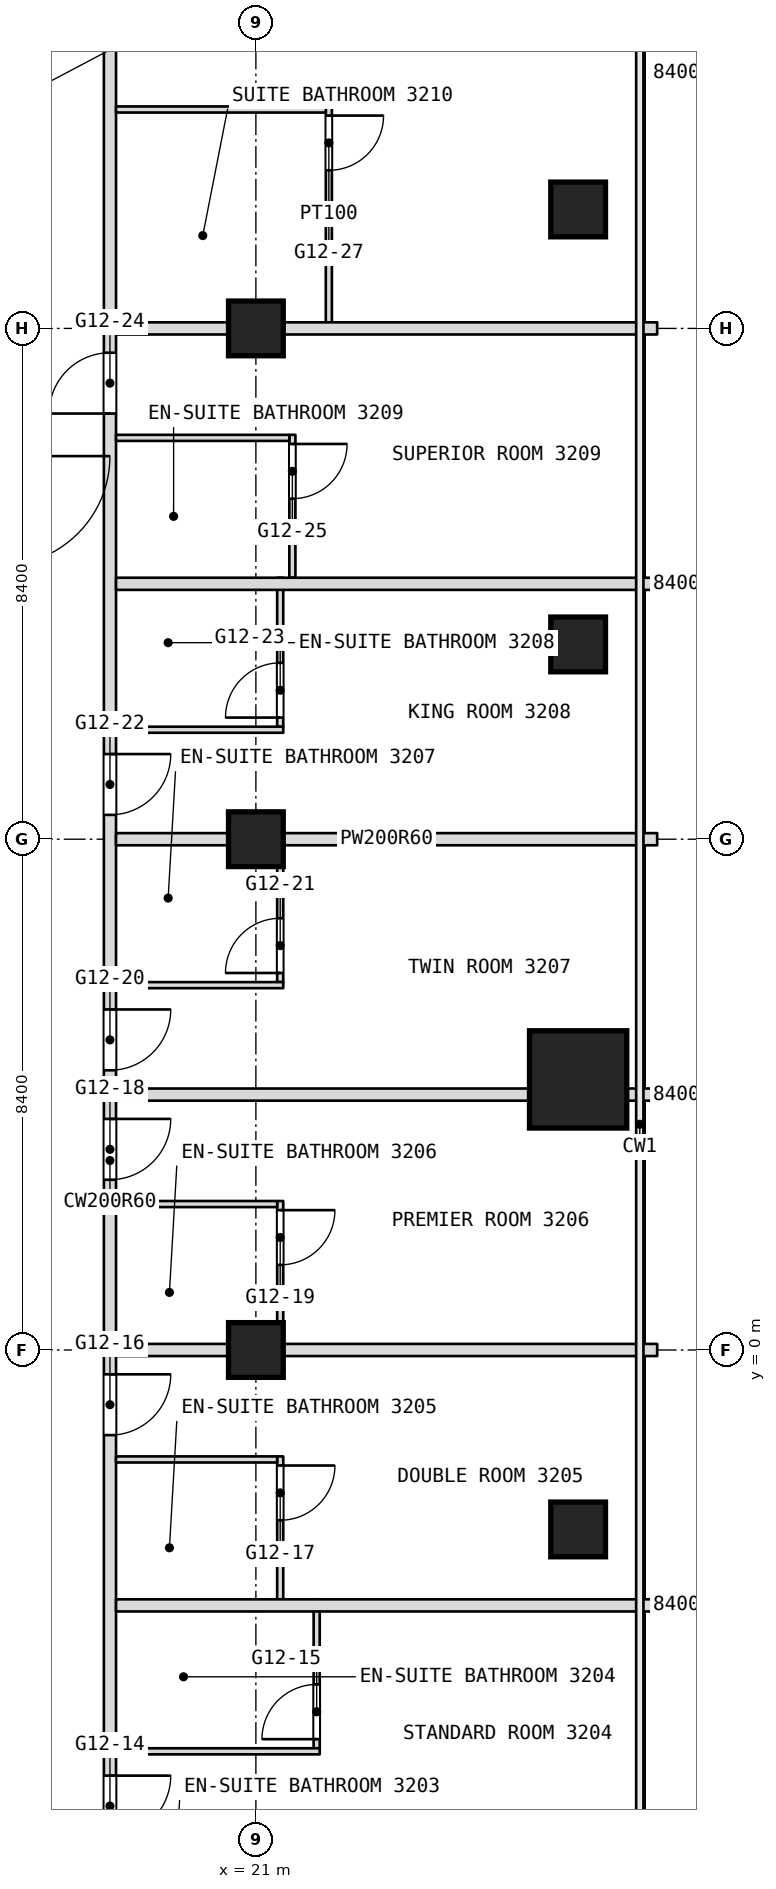
"""IFC4 building model, lengths in metres.
Left out: names, types, materials, properties, quantities, classifications, styles, units other than length and angle.
Written with IfcOpenShell. Run it as: python <this file> out.ifc"""

import sys

from ifc_helpers import new_model, si_unit, direction, frame, frame_2d, origin, origin_2d, place, context, subcontext, project, spatial, rectangle, extrude, element, fill, save


model = new_model("IFC4")
c1 = context("Model", 3, precision=1e-05, world=origin(), true_north=direction((0.0, 1.0)))
c2 = subcontext(c1, "Body", "Model", "MODEL_VIEW")
j1 = project(units=[si_unit("LENGTHUNIT", "METRE"), si_unit("PLANEANGLEUNIT", "RADIAN")], contexts=[c1])
p1 = place(None, origin())
s1 = spatial("IfcSite", under=j1, at=p1, CompositionType="ELEMENT")
p2 = place(p1, origin())
s2 = spatial("IfcBuilding", under=s1, at=p2, CompositionType="ELEMENT")
p3 = place(p2, frame((0.0, 0.0, 140.9)))
s3 = spatial("IfcBuildingStorey", under=s2, at=p3, CompositionType="ELEMENT", Elevation=140.9)
p4 = place(p3, frame((26.3, 4.45, 0.0), z_axis=(0.0, 0.0, 1.0), x_axis=(1.0, 0.0, 0.0)))
e1 = element("IfcColumn", 1, at=p4, inside=s3, PredefinedType="COLUMN", context=c2, shape_type="SweptSolid", body=[
    extrude(rectangle(XDim=1.6, YDim=1.6, at=origin_2d()), origin(), (0.0, 0.0, 1.0), 3.6),
])
for number, where, z_axis, x_axis in (
    (2, (21.0, 0.0, 0.0), (0.0, 0.0, 1.0), (1.0, 0.0, 0.0)),
    (3, (21.0, 8.4, 0.0), (0.0, 0.0, 1.0), (1.0, 0.0, 0.0)),
    (4, (21.0, 16.8, 0.0), (0.0, 0.0, 1.0), (1.0, 0.0, 0.0)),
    (5, (26.3, 18.756, 0.0), (0.0, 0.0, 1.0), (1.0, 0.0, 0.0)),
    (6, (26.3, 11.603, 0.0), (0.0, 0.0, 1.0), (1.0, 0.0, 0.0)),
    (7, (26.3, -2.951, 0.0), (0.0, 0.0, 1.0), (1.0, 0.0, 0.0)),
):
    element("IfcColumn", number, at=place(p3, frame(where, z_axis=z_axis, x_axis=x_axis)), inside=s3, PredefinedType="COLUMN", context=c2, shape_type="SweptSolid", body=[
        extrude(rectangle(XDim=0.9, YDim=0.9, at=origin_2d()), origin(), (0.0, 0.0, 1.0), 3.6),
    ])
p5 = place(p3, frame((22.2, 16.9, 0.0), z_axis=(0.0, 0.0, 1.0), x_axis=(0.0, 1.0, 0.0)))
e8 = element("IfcWall", 8, at=p5, inside=s3, PredefinedType="PARTITIONING", context=c2, shape_type="SweptSolid", body=[
    extrude(rectangle(XDim=3.55, YDim=0.1, at=frame_2d((1.775, 0.0))), origin(), (0.0, 0.0, 1.0), 3.34),
])
p6 = place(p5, frame((2.5, 0.0, 0.0)))
e9 = element("IfcOpeningElement", 9, at=p6, cuts=e8, PredefinedType="OPENING", context=c2, shape_type="SweptSolid", body=[
    extrude(rectangle(XDim=0.9, YDim=2.1, at=frame_2d((0.45, 1.05))), frame((0.0, 0.05, 0.0), z_axis=(0.0, -1.0, 0.0), x_axis=(1.0, 0.0, 0.0)), (0.0, 0.0, 1.0), 0.1),
])
p7 = place(p3, frame((22.0, -6.55, 0.0), z_axis=(0.0, 0.0, 1.0), x_axis=(0.0, 1.0, 0.0)))
e10 = element("IfcWall", 10, at=p7, inside=s3, PredefinedType="PARTITIONING", context=c2, shape_type="SweptSolid", body=[
    extrude(rectangle(XDim=2.45, YDim=0.1, at=frame_2d((1.225, 0.0))), origin(), (0.0, 0.0, 1.0), 3.34),
])
p8 = place(p7, frame((0.15, 0.0, 0.0)))
e11 = element("IfcOpeningElement", 11, at=p8, cuts=e10, PredefinedType="OPENING", context=c2, shape_type="SweptSolid", body=[
    extrude(rectangle(XDim=0.9, YDim=2.1, at=frame_2d((0.45, 1.05))), frame((0.0, 0.05, 0.0), z_axis=(0.0, -1.0, 0.0), x_axis=(1.0, 0.0, 0.0)), (0.0, 0.0, 1.0), 0.1),
])
p9 = place(p3, frame((21.6, 12.7, 0.0), z_axis=(0.0, 0.0, 1.0), x_axis=(0.0, 1.0, 0.0)))
e12 = element("IfcWall", 12, at=p9, inside=s3, PredefinedType="PARTITIONING", context=c2, shape_type="SweptSolid", body=[
    extrude(rectangle(XDim=2.35, YDim=0.1, at=frame_2d((1.175, 0.0))), origin(), (0.0, 0.0, 1.0), 3.34),
])
p10 = place(p9, frame((1.3, 0.0, 0.0)))
e13 = element("IfcOpeningElement", 13, at=p10, cuts=e12, PredefinedType="OPENING", context=c2, shape_type="SweptSolid", body=[
    extrude(rectangle(XDim=0.9, YDim=2.1, at=frame_2d((0.45, 1.05))), frame((0.0, 0.05, 0.0), z_axis=(0.0, -1.0, 0.0), x_axis=(1.0, 0.0, 0.0)), (0.0, 0.0, 1.0), 0.1),
])
p11 = place(p3, frame((21.4, -4.1, 0.0), z_axis=(0.0, 0.0, 1.0), x_axis=(0.0, 1.0, 0.0)))
e14 = element("IfcWall", 14, at=p11, inside=s3, PredefinedType="PARTITIONING", context=c2, shape_type="SweptSolid", body=[
    extrude(rectangle(XDim=2.35, YDim=0.1, at=frame_2d((1.175, 0.0))), origin(), (0.0, 0.0, 1.0), 3.34),
])
p12 = place(p11, frame((1.3, 0.0, 0.0)))
e15 = element("IfcOpeningElement", 15, at=p12, cuts=e14, PredefinedType="OPENING", context=c2, shape_type="SweptSolid", body=[
    extrude(rectangle(XDim=0.9, YDim=2.1, at=frame_2d((0.45, 1.05))), frame((0.0, 0.05, 0.0), z_axis=(0.0, -1.0, 0.0), x_axis=(1.0, 0.0, 0.0)), (0.0, 0.0, 1.0), 0.1),
])
p13 = place(p3, frame((21.4, 0.1, 0.0), z_axis=(0.0, 0.0, 1.0), x_axis=(0.0, 1.0, 0.0)))
e16 = element("IfcWall", 16, at=p13, inside=s3, PredefinedType="PARTITIONING", context=c2, shape_type="SweptSolid", body=[
    extrude(rectangle(XDim=2.35, YDim=0.1, at=frame_2d((1.175, 0.0))), origin(), (0.0, 0.0, 1.0), 3.34),
])
p14 = place(p13, frame((1.3, 0.0, 0.0)))
e17 = element("IfcOpeningElement", 17, at=p14, cuts=e16, PredefinedType="OPENING", context=c2, shape_type="SweptSolid", body=[
    extrude(rectangle(XDim=0.9, YDim=2.1, at=frame_2d((0.45, 1.05))), frame((0.0, 0.05, 0.0), z_axis=(0.0, -1.0, 0.0), x_axis=(1.0, 0.0, 0.0)), (0.0, 0.0, 1.0), 0.1),
])
p15 = place(p3, frame((21.4, 6.05, 0.0), z_axis=(0.0, 0.0, 1.0), x_axis=(0.0, 1.0, 0.0)))
e18 = element("IfcWall", 18, at=p15, inside=s3, PredefinedType="PARTITIONING", context=c2, shape_type="SweptSolid", body=[
    extrude(rectangle(XDim=2.45, YDim=0.1, at=frame_2d((1.225, 0.0))), origin(), (0.0, 0.0, 1.0), 3.34),
])
p16 = place(p15, frame((0.15, 0.0, 0.0)))
e19 = element("IfcOpeningElement", 19, at=p16, cuts=e18, PredefinedType="OPENING", context=c2, shape_type="SweptSolid", body=[
    extrude(rectangle(XDim=0.9, YDim=2.1, at=frame_2d((0.45, 1.05))), frame((0.0, 0.05, 0.0), z_axis=(0.0, -1.0, 0.0), x_axis=(1.0, 0.0, 0.0)), (0.0, 0.0, 1.0), 0.1),
])
p17 = place(p3, frame((21.4, 10.25, 0.0), z_axis=(0.0, 0.0, 1.0), x_axis=(0.0, 1.0, 0.0)))
e20 = element("IfcWall", 20, at=p17, inside=s3, PredefinedType="PARTITIONING", context=c2, shape_type="SweptSolid", body=[
    extrude(rectangle(XDim=2.45, YDim=0.1, at=frame_2d((1.225, 0.0))), origin(), (0.0, 0.0, 1.0), 3.34),
])
p18 = place(p17, frame((0.15, 0.0, 0.0)))
e21 = element("IfcOpeningElement", 21, at=p18, cuts=e20, PredefinedType="OPENING", context=c2, shape_type="SweptSolid", body=[
    extrude(rectangle(XDim=0.9, YDim=2.1, at=frame_2d((0.45, 1.05))), frame((0.0, 0.05, 0.0), z_axis=(0.0, -1.0, 0.0), x_axis=(1.0, 0.0, 0.0)), (0.0, 0.0, 1.0), 0.1),
])
p19 = place(p3, frame((18.6, -21.708, 0.0), z_axis=(0.0, 0.0, 1.0), x_axis=(0.0, 1.0, 0.0)))
e22 = element("IfcWall", 22, at=p19, inside=s3, PredefinedType="PARTITIONING", context=c2, shape_type="SweptSolid", body=[
    extrude(rectangle(XDim=49.648, YDim=0.2, at=frame_2d((24.824, 0.0))), origin(), (0.0, 0.0, 1.0), 3.34),
])
p20 = place(p19, frame((2.8, 0.0, 0.0)))
e23 = element("IfcOpeningElement", 23, at=p20, cuts=e22, PredefinedType="OPENING", context=c2, shape_type="SweptSolid", body=[
    extrude(rectangle(XDim=1.0, YDim=2.1, at=frame_2d((0.5, 1.05))), frame((0.0, 0.1, 0.0), z_axis=(0.0, -1.0, 0.0), x_axis=(1.0, 0.0, 0.0)), (0.0, 0.0, 1.0), 0.2),
])
p21 = place(p19, frame((7.708, 0.0, 0.0)))
e24 = element("IfcOpeningElement", 24, at=p21, cuts=e22, PredefinedType="OPENING", context=c2, shape_type="SweptSolid", body=[
    extrude(rectangle(XDim=1.0, YDim=2.1, at=frame_2d((0.5, 1.05))), frame((0.0, 0.1, 0.0), z_axis=(0.0, -1.0, 0.0), x_axis=(1.0, 0.0, 0.0)), (0.0, 0.0, 1.0), 0.2),
])
p22 = place(p19, frame((9.508, 0.0, 0.0)))
e25 = element("IfcOpeningElement", 25, at=p22, cuts=e22, PredefinedType="OPENING", context=c2, shape_type="SweptSolid", body=[
    extrude(rectangle(XDim=1.0, YDim=2.1, at=frame_2d((0.5, 1.05))), frame((0.0, 0.1, 0.0), z_axis=(0.0, -1.0, 0.0), x_axis=(1.0, 0.0, 0.0)), (0.0, 0.0, 1.0), 0.2),
])
p23 = place(p19, frame((13.708, 0.0, 0.0)))
e26 = element("IfcOpeningElement", 26, at=p23, cuts=e22, PredefinedType="OPENING", context=c2, shape_type="SweptSolid", body=[
    extrude(rectangle(XDim=1.0, YDim=2.1, at=frame_2d((0.5, 1.05))), frame((0.0, 0.1, 0.0), z_axis=(0.0, -1.0, 0.0), x_axis=(1.0, 0.0, 0.0)), (0.0, 0.0, 1.0), 0.2),
])
p24 = place(p19, frame((20.308, 0.0, 0.0)))
e27 = element("IfcOpeningElement", 27, at=p24, cuts=e22, PredefinedType="OPENING", context=c2, shape_type="SweptSolid", body=[
    extrude(rectangle(XDim=1.0, YDim=2.1, at=frame_2d((0.5, 1.05))), frame((0.0, 0.1, 0.0), z_axis=(0.0, -1.0, 0.0), x_axis=(1.0, 0.0, 0.0)), (0.0, 0.0, 1.0), 0.2),
])
p25 = place(p19, frame((24.508, 0.0, 0.0)))
e28 = element("IfcOpeningElement", 28, at=p25, cuts=e22, PredefinedType="OPENING", context=c2, shape_type="SweptSolid", body=[
    extrude(rectangle(XDim=1.0, YDim=2.1, at=frame_2d((0.5, 1.05))), frame((0.0, 0.1, 0.0), z_axis=(0.0, -1.0, 0.0), x_axis=(1.0, 0.0, 0.0)), (0.0, 0.0, 1.0), 0.2),
])
p26 = place(p19, frame((26.308, 0.0, 0.0)))
e29 = element("IfcOpeningElement", 29, at=p26, cuts=e22, PredefinedType="OPENING", context=c2, shape_type="SweptSolid", body=[
    extrude(rectangle(XDim=1.0, YDim=2.1, at=frame_2d((0.5, 1.05))), frame((0.0, 0.1, 0.0), z_axis=(0.0, -1.0, 0.0), x_axis=(1.0, 0.0, 0.0)), (0.0, 0.0, 1.0), 0.2),
])
p27 = place(p19, frame((30.508, 0.0, 0.0)))
e30 = element("IfcOpeningElement", 30, at=p27, cuts=e22, PredefinedType="OPENING", context=c2, shape_type="SweptSolid", body=[
    extrude(rectangle(XDim=1.0, YDim=2.1, at=frame_2d((0.5, 1.05))), frame((0.0, 0.1, 0.0), z_axis=(0.0, -1.0, 0.0), x_axis=(1.0, 0.0, 0.0)), (0.0, 0.0, 1.0), 0.2),
])
p28 = place(p19, frame((37.108, 0.0, 0.0)))
e31 = element("IfcOpeningElement", 31, at=p28, cuts=e22, PredefinedType="OPENING", context=c2, shape_type="SweptSolid", body=[
    extrude(rectangle(XDim=1.0, YDim=2.1, at=frame_2d((0.5, 1.05))), frame((0.0, 0.1, 0.0), z_axis=(0.0, -1.0, 0.0), x_axis=(1.0, 0.0, 0.0)), (0.0, 0.0, 1.0), 0.2),
])
p29 = place(p19, frame((43.558, 0.0, 0.0)))
e32 = element("IfcOpeningElement", 32, at=p29, cuts=e22, PredefinedType="OPENING", context=c2, shape_type="SweptSolid", body=[
    extrude(rectangle(XDim=1.1, YDim=2.1, at=frame_2d((0.55, 1.05))), frame((0.0, 0.1, 0.0), z_axis=(0.0, -1.0, 0.0), x_axis=(1.0, 0.0, 0.0)), (0.0, 0.0, 1.0), 0.2),
])
p30 = place(p3, frame((18.7, -6.6, 0.0), z_axis=(0.0, 0.0, 1.0), x_axis=(1.0, 0.0, 0.0)))
e33 = element("IfcWall", 33, at=p30, inside=s3, PredefinedType="PARTITIONING", context=c2, shape_type="SweptSolid", body=[
    extrude(rectangle(XDim=3.35, YDim=0.1, at=frame_2d((1.675, 0.0))), origin(), (0.0, 0.0, 1.0), 3.34),
])
p31 = place(p3, frame((18.7, -4.2, 0.0), z_axis=(0.0, 0.0, 1.0), x_axis=(1.0, 0.0, 0.0)))
e34 = element("IfcWall", 34, at=p31, inside=s3, PredefinedType="PARTITIONING", context=c2, shape_type="SweptSolid", body=[
    extrude(rectangle(XDim=8.9, YDim=0.2, at=frame_2d((4.45, 0.0))), origin(), (0.0, 0.0, 1.0), 3.34),
])
p32 = place(p3, frame((18.7, -1.8, 0.0), z_axis=(0.0, 0.0, 1.0), x_axis=(1.0, 0.0, 0.0)))
e35 = element("IfcWall", 35, at=p32, inside=s3, PredefinedType="PARTITIONING", context=c2, shape_type="SweptSolid", body=[
    extrude(rectangle(XDim=2.65, YDim=0.1, at=frame_2d((1.325, 0.0))), origin(), (0.0, 0.0, 1.0), 3.34),
])
p33 = place(p3, frame((18.7, 0.0, 0.0), z_axis=(0.0, 0.0, 1.0), x_axis=(1.0, 0.0, 0.0)))
e36 = element("IfcWall", 36, at=p33, inside=s3, PredefinedType="PARTITIONING", context=c2, shape_type="SweptSolid", body=[
    extrude(rectangle(XDim=8.9, YDim=0.2, at=frame_2d((4.45, 0.0))), origin(), (0.0, 0.0, 1.0), 2.89),
])
p34 = place(p3, frame((18.7, 2.4, 0.0), z_axis=(0.0, 0.0, 1.0), x_axis=(1.0, 0.0, 0.0)))
e37 = element("IfcWall", 37, at=p34, inside=s3, PredefinedType="PARTITIONING", context=c2, shape_type="SweptSolid", body=[
    extrude(rectangle(XDim=2.65, YDim=0.1, at=frame_2d((1.325, 0.0))), origin(), (0.0, 0.0, 1.0), 3.34),
])
p35 = place(p3, frame((18.7, 4.2, 0.0), z_axis=(0.0, 0.0, 1.0), x_axis=(1.0, 0.0, 0.0)))
e38 = element("IfcWall", 38, at=p35, inside=s3, PredefinedType="PARTITIONING", context=c2, shape_type="SweptSolid", body=[
    extrude(rectangle(XDim=6.8, YDim=0.2, at=frame_2d((3.4, 0.0))), origin(), (0.0, 0.0, 1.0), 3.34),
])
p36 = place(p3, frame((27.1, 4.2, 0.0), z_axis=(0.0, 0.0, 1.0), x_axis=(1.0, 0.0, 0.0)))
e39 = element("IfcWall", 39, at=p36, inside=s3, PredefinedType="PARTITIONING", context=c2, shape_type="SweptSolid", body=[
    extrude(rectangle(XDim=0.5, YDim=0.2, at=frame_2d((0.25, 0.0))), origin(), (0.0, 0.0, 1.0), 3.34),
])
p37 = place(p3, frame((18.7, 6.0, 0.0), z_axis=(0.0, 0.0, 1.0), x_axis=(1.0, 0.0, 0.0)))
e40 = element("IfcWall", 40, at=p37, inside=s3, PredefinedType="PARTITIONING", context=c2, shape_type="SweptSolid", body=[
    extrude(rectangle(XDim=2.75, YDim=0.1, at=frame_2d((1.375, 0.0))), origin(), (0.0, 0.0, 1.0), 3.34),
])
p38 = place(p3, frame((18.7, 8.4, 0.0), z_axis=(0.0, 0.0, 1.0), x_axis=(1.0, 0.0, 0.0)))
e41 = element("IfcWall", 41, at=p38, inside=s3, PredefinedType="PARTITIONING", context=c2, shape_type="SweptSolid", body=[
    extrude(rectangle(XDim=8.9, YDim=0.2, at=frame_2d((4.45, 0.0))), origin(), (0.0, 0.0, 1.0), 2.89),
])
p39 = place(p3, frame((18.7, 10.2, 0.0), z_axis=(0.0, 0.0, 1.0), x_axis=(1.0, 0.0, 0.0)))
e42 = element("IfcWall", 42, at=p39, inside=s3, PredefinedType="PARTITIONING", context=c2, shape_type="SweptSolid", body=[
    extrude(rectangle(XDim=2.75, YDim=0.1, at=frame_2d((1.375, 0.0))), origin(), (0.0, 0.0, 1.0), 3.34),
])
p40 = place(p3, frame((18.7, 12.6, 0.0), z_axis=(0.0, 0.0, 1.0), x_axis=(1.0, 0.0, 0.0)))
e43 = element("IfcWall", 43, at=p40, inside=s3, PredefinedType="PARTITIONING", context=c2, shape_type="SweptSolid", body=[
    extrude(rectangle(XDim=8.9, YDim=0.2, at=frame_2d((4.45, 0.0))), origin(), (0.0, 0.0, 1.0), 3.34),
])
p41 = place(p3, frame((18.7, 15.0, 0.0), z_axis=(0.0, 0.0, 1.0), x_axis=(1.0, 0.0, 0.0)))
e44 = element("IfcWall", 44, at=p41, inside=s3, PredefinedType="PARTITIONING", context=c2, shape_type="SweptSolid", body=[
    extrude(rectangle(XDim=2.85, YDim=0.1, at=frame_2d((1.425, 0.0))), origin(), (0.0, 0.0, 1.0), 3.34),
])
p42 = place(p3, frame((18.7, 16.8, 0.0), z_axis=(0.0, 0.0, 1.0), x_axis=(1.0, 0.0, 0.0)))
e45 = element("IfcWall", 45, at=p42, inside=s3, PredefinedType="PARTITIONING", context=c2, shape_type="SweptSolid", body=[
    extrude(rectangle(XDim=8.9, YDim=0.2, at=frame_2d((4.45, 0.0))), origin(), (0.0, 0.0, 1.0), 2.89),
])
p43 = place(p3, frame((18.7, 20.4, 0.0), z_axis=(0.0, 0.0, 1.0), x_axis=(1.0, 0.0, 0.0)))
e46 = element("IfcWall", 46, at=p43, inside=s3, PredefinedType="PARTITIONING", context=c2, shape_type="SweptSolid", body=[
    extrude(rectangle(XDim=3.45, YDim=0.1, at=frame_2d((1.725, 0.0))), origin(), (0.0, 0.0, 1.0), 3.34),
])
p44 = place(p6, origin())
e47 = element("IfcDoor", 47, at=p44, inside=s3, OperationType="SINGLE_SWING_RIGHT", PredefinedType="DOOR", context=c2, shape_type="SweptSolid", body=[
    extrude(rectangle(XDim=0.9, YDim=2.1, at=frame_2d((0.45, 1.05))), frame((0.0, 0.025, 0.0), z_axis=(0.0, -1.0, 0.0), x_axis=(1.0, 0.0, 0.0)), (0.0, 0.0, 1.0), 0.05),
])
fill(e9, e47)
p45 = place(p8, origin())
e48 = element("IfcDoor", 48, at=p45, inside=s3, OperationType="SINGLE_SWING_LEFT", PredefinedType="DOOR", context=c2, shape_type="SweptSolid", body=[
    extrude(rectangle(XDim=0.9, YDim=2.1, at=frame_2d((0.45, 1.05))), frame((0.0, 0.025, 0.0), z_axis=(0.0, -1.0, 0.0), x_axis=(1.0, 0.0, 0.0)), (0.0, 0.0, 1.0), 0.05),
])
fill(e11, e48)
p46 = place(p10, origin())
e49 = element("IfcDoor", 49, at=p46, inside=s3, OperationType="SINGLE_SWING_RIGHT", PredefinedType="DOOR", context=c2, shape_type="SweptSolid", body=[
    extrude(rectangle(XDim=0.9, YDim=2.1, at=frame_2d((0.45, 1.05))), frame((0.0, 0.025, 0.0), z_axis=(0.0, -1.0, 0.0), x_axis=(1.0, 0.0, 0.0)), (0.0, 0.0, 1.0), 0.05),
])
fill(e13, e49)
p47 = place(p12, origin())
e50 = element("IfcDoor", 50, at=p47, inside=s3, OperationType="SINGLE_SWING_RIGHT", PredefinedType="DOOR", context=c2, shape_type="SweptSolid", body=[
    extrude(rectangle(XDim=0.9, YDim=2.1, at=frame_2d((0.45, 1.05))), frame((0.0, 0.025, 0.0), z_axis=(0.0, -1.0, 0.0), x_axis=(1.0, 0.0, 0.0)), (0.0, 0.0, 1.0), 0.05),
])
fill(e15, e50)
p48 = place(p14, origin())
e51 = element("IfcDoor", 51, at=p48, inside=s3, OperationType="SINGLE_SWING_RIGHT", PredefinedType="DOOR", context=c2, shape_type="SweptSolid", body=[
    extrude(rectangle(XDim=0.9, YDim=2.1, at=frame_2d((0.45, 1.05))), frame((0.0, 0.025, 0.0), z_axis=(0.0, -1.0, 0.0), x_axis=(1.0, 0.0, 0.0)), (0.0, 0.0, 1.0), 0.05),
])
fill(e17, e51)
p49 = place(p16, origin())
e52 = element("IfcDoor", 52, at=p49, inside=s3, OperationType="SINGLE_SWING_LEFT", PredefinedType="DOOR", context=c2, shape_type="SweptSolid", body=[
    extrude(rectangle(XDim=0.9, YDim=2.1, at=frame_2d((0.45, 1.05))), frame((0.0, 0.025, 0.0), z_axis=(0.0, -1.0, 0.0), x_axis=(1.0, 0.0, 0.0)), (0.0, 0.0, 1.0), 0.05),
])
fill(e19, e52)
p50 = place(p18, origin())
e53 = element("IfcDoor", 53, at=p50, inside=s3, OperationType="SINGLE_SWING_LEFT", PredefinedType="DOOR", context=c2, shape_type="SweptSolid", body=[
    extrude(rectangle(XDim=0.9, YDim=2.1, at=frame_2d((0.45, 1.05))), frame((0.0, 0.025, 0.0), z_axis=(0.0, -1.0, 0.0), x_axis=(1.0, 0.0, 0.0)), (0.0, 0.0, 1.0), 0.05),
])
fill(e21, e53)
p51 = place(p23, origin())
e54 = element("IfcDoor", 54, at=p51, inside=s3, OperationType="SINGLE_SWING_RIGHT", PredefinedType="DOOR", context=c2, shape_type="SweptSolid", body=[
    extrude(rectangle(XDim=1.0, YDim=2.1, at=frame_2d((0.5, 1.05))), frame((0.0, 0.025, 0.0), z_axis=(0.0, -1.0, 0.0), x_axis=(1.0, 0.0, 0.0)), (0.0, 0.0, 1.0), 0.05),
])
fill(e26, e54)
p52 = place(p24, origin())
e55 = element("IfcDoor", 55, at=p52, inside=s3, OperationType="SINGLE_SWING_RIGHT", PredefinedType="DOOR", context=c2, shape_type="SweptSolid", body=[
    extrude(rectangle(XDim=1.0, YDim=2.1, at=frame_2d((0.5, 1.05))), frame((0.0, 0.025, 0.0), z_axis=(0.0, -1.0, 0.0), x_axis=(1.0, 0.0, 0.0)), (0.0, 0.0, 1.0), 0.05),
])
fill(e27, e55)
p53 = place(p25, origin())
e56 = element("IfcDoor", 56, at=p53, inside=s3, OperationType="SINGLE_SWING_RIGHT", PredefinedType="DOOR", context=c2, shape_type="SweptSolid", body=[
    extrude(rectangle(XDim=1.0, YDim=2.1, at=frame_2d((0.5, 1.05))), frame((0.0, 0.025, 0.0), z_axis=(0.0, -1.0, 0.0), x_axis=(1.0, 0.0, 0.0)), (0.0, 0.0, 1.0), 0.05),
])
fill(e28, e56)
p54 = place(p26, origin())
e57 = element("IfcDoor", 57, at=p54, inside=s3, OperationType="SINGLE_SWING_RIGHT", PredefinedType="DOOR", context=c2, shape_type="SweptSolid", body=[
    extrude(rectangle(XDim=1.0, YDim=2.1, at=frame_2d((0.5, 1.05))), frame((0.0, 0.025, 0.0), z_axis=(0.0, -1.0, 0.0), x_axis=(1.0, 0.0, 0.0)), (0.0, 0.0, 1.0), 0.05),
])
fill(e29, e57)
p55 = place(p27, origin())
e58 = element("IfcDoor", 58, at=p55, inside=s3, OperationType="SINGLE_SWING_RIGHT", PredefinedType="DOOR", context=c2, shape_type="SweptSolid", body=[
    extrude(rectangle(XDim=1.0, YDim=2.1, at=frame_2d((0.5, 1.05))), frame((0.0, 0.025, 0.0), z_axis=(0.0, -1.0, 0.0), x_axis=(1.0, 0.0, 0.0)), (0.0, 0.0, 1.0), 0.05),
])
fill(e30, e58)
p56 = place(p28, origin())
e59 = element("IfcDoor", 59, at=p56, inside=s3, OperationType="SINGLE_SWING_RIGHT", PredefinedType="DOOR", context=c2, shape_type="SweptSolid", body=[
    extrude(rectangle(XDim=1.0, YDim=2.1, at=frame_2d((0.5, 1.05))), frame((0.0, 0.025, 0.0), z_axis=(0.0, -1.0, 0.0), x_axis=(1.0, 0.0, 0.0)), (0.0, 0.0, 1.0), 0.05),
])
fill(e31, e59)
save(model, sys.argv[1])
